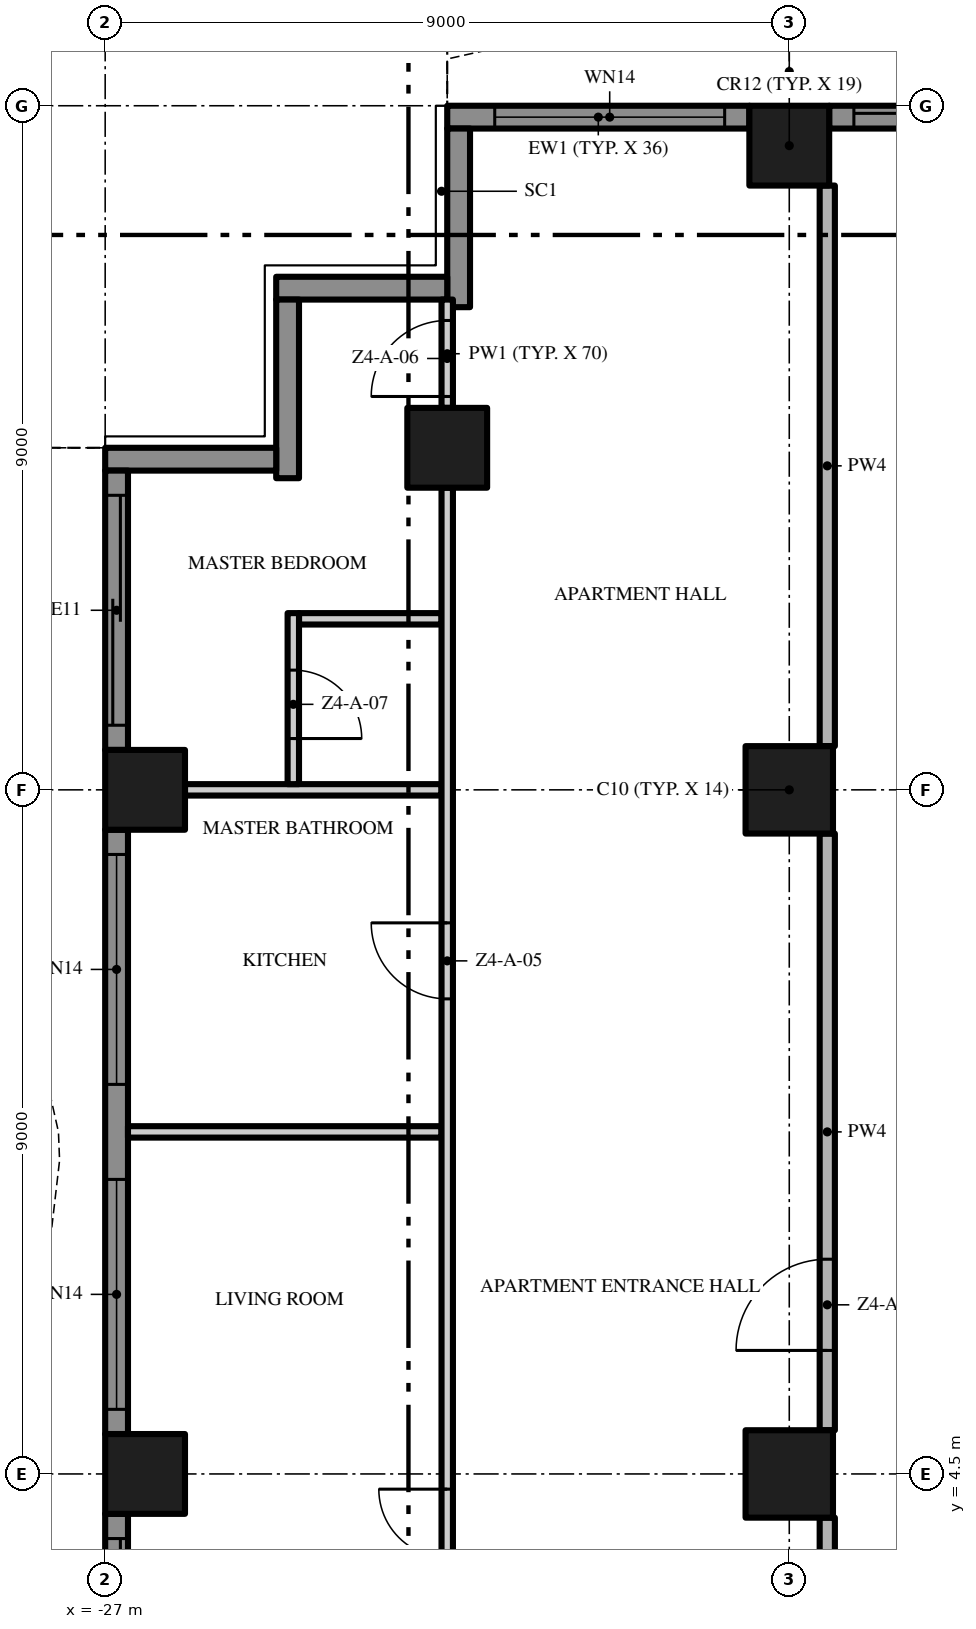
"""IFC4 building model, lengths in metres.
Left out: names, types, materials, properties, quantities, classifications, styles, units other than length and angle.
Written with IfcOpenShell. Run it as: python <this file> out.ifc"""

import sys

from ifc_helpers import new_model, si_unit, direction, frame, frame_2d, origin, origin_2d, place, context, subcontext, project, spatial, polyline, rectangle, outline, extrude, element, fill, save


model = new_model("IFC4")
c1 = context("Model", 3, precision=1e-05, world=origin(), true_north=direction((0.0, 1.0)))
c2 = subcontext(c1, "Body", "Model", "MODEL_VIEW")
j1 = project(units=[si_unit("LENGTHUNIT", "METRE"), si_unit("PLANEANGLEUNIT", "RADIAN")], contexts=[c1])
p1 = place(None, origin())
s1 = spatial("IfcSite", under=j1, at=p1, CompositionType="ELEMENT")
p2 = place(p1, origin())
s2 = spatial("IfcBuilding", under=s1, at=p2, CompositionType="ELEMENT")
p3 = place(p2, frame((0.0, 0.0, 184.4)))
s3 = spatial("IfcBuildingStorey", under=s2, at=p3, CompositionType="ELEMENT", Elevation=184.4)
p4 = place(p3, frame((-18.0, 13.5, 0.0), z_axis=(0.0, 0.0, 1.0), x_axis=(1.0, 0.0, 0.0)))
e1 = element("IfcColumn", 1, at=p4, inside=s3, PredefinedType="COLUMN", context=c2, shape_type="SweptSolid", body=[
    extrude(rectangle(XDim=1.15, YDim=1.15, at=origin_2d()), origin(), (0.0, 0.0, 1.0), 3.5),
])
p5 = place(p3, frame((-18.0, 21.975, 0.0), z_axis=(0.0, 0.0, 1.0), x_axis=(1.0, 0.0, 0.0)))
e2 = element("IfcColumn", 2, at=p5, inside=s3, PredefinedType="COLUMN", context=c2, shape_type="SweptSolid", body=[
    extrude(rectangle(XDim=1.05, YDim=1.05, at=origin_2d()), origin(), (0.0, 0.0, 1.0), 3.5),
])
p6 = place(p3, frame((-18.0, 4.5, 0.0), z_axis=(0.0, 0.0, 1.0), x_axis=(1.0, 0.0, 0.0)))
e3 = element("IfcColumn", 3, at=p6, inside=s3, PredefinedType="COLUMN", context=c2, shape_type="SweptSolid", body=[
    extrude(rectangle(XDim=1.15, YDim=1.15, at=origin_2d()), origin(), (0.0, 0.0, 1.0), 3.5),
])
for number, where, z_axis, x_axis in (
    (4, (-26.475, 13.5, 0.0), (0.0, 0.0, 1.0), (1.0, 0.0, 0.0)),
    (5, (-22.5, 18.0, 0.0), (0.0, 0.0, 1.0), (1.0, 0.0, 0.0)),
    (6, (-26.475, 4.5, 0.0), (0.0, 0.0, 1.0), (1.0, 0.0, 0.0)),
):
    element("IfcColumn", number, at=place(p3, frame(where, z_axis=z_axis, x_axis=x_axis)), inside=s3, PredefinedType="COLUMN", context=c2, shape_type="SweptSolid", body=[
        extrude(rectangle(XDim=1.05, YDim=1.05, at=origin_2d()), origin(), (0.0, 0.0, 1.0), 3.5),
    ])
p7 = place(p3, frame((-17.475, 22.35, 0.0), z_axis=(0.0, 0.0, 1.0), x_axis=(1.0, 0.0, 0.0)))
e7 = element("IfcWall", 7, at=p7, inside=s3, PredefinedType="SOLIDWALL", context=c2, shape_type="SweptSolid", body=[
    extrude(rectangle(XDim=3.975, YDim=0.3, at=frame_2d((1.988, 0.0))), origin(), (0.0, 0.0, 1.0), 3.5),
])
p8 = place(p7, frame((0.325, 0.0, 0.0)))
e8 = element("IfcOpeningElement", 8, at=p8, cuts=e7, PredefinedType="OPENING", context=c2, shape_type="SweptSolid", body=[
    extrude(rectangle(XDim=3.025, YDim=2.4, at=frame_2d((1.512, 1.2))), frame((0.0, 0.16, 0.0), z_axis=(0.0, -1.0, 0.0), x_axis=(1.0, 0.0, 0.0)), (0.0, 0.0, 1.0), 0.32),
])
p9 = place(p3, frame((-22.5, 22.35, 0.0), z_axis=(0.0, 0.0, 1.0), x_axis=(1.0, 0.0, 0.0)))
e9 = element("IfcWall", 9, at=p9, inside=s3, PredefinedType="SOLIDWALL", context=c2, shape_type="SweptSolid", body=[
    extrude(rectangle(XDim=3.975, YDim=0.3, at=frame_2d((1.988, 0.0))), origin(), (0.0, 0.0, 1.0), 3.5),
])
p10 = place(p9, frame((0.625, 0.0, 0.45)))
e10 = element("IfcOpeningElement", 10, at=p10, cuts=e9, PredefinedType="OPENING", context=c2, shape_type="SweptSolid", body=[
    extrude(rectangle(XDim=3.025, YDim=2.65, at=frame_2d((1.512, 1.325))), frame((0.0, 0.16, 0.0), z_axis=(0.0, -1.0, 0.0), x_axis=(1.0, 0.0, 0.0)), (0.0, 0.0, 1.0), 0.32),
])
p11 = place(p3, frame((-22.35, 19.85, 0.0), z_axis=(0.0, 0.0, 1.0), x_axis=(0.0, 1.0, 0.0)))
e11 = element("IfcWall", 11, at=p11, inside=s3, PredefinedType="SOLIDWALL", context=c2, shape_type="SweptSolid", body=[
    extrude(rectangle(XDim=2.35, YDim=0.3, at=frame_2d((1.175, 0.0))), origin(), (0.0, 0.0, 1.0), 3.5),
])
p12 = place(p3, frame((-24.75, 20.1, 0.0), z_axis=(0.0, 0.0, 1.0), x_axis=(1.0, 0.0, 0.0)))
e12 = element("IfcWall", 12, at=p12, inside=s3, PredefinedType="SOLIDWALL", context=c2, shape_type="SweptSolid", body=[
    extrude(rectangle(XDim=2.25, YDim=0.3, at=frame_2d((1.125, 0.0))), origin(), (0.0, 0.0, 1.0), 3.5),
])
p13 = place(p3, frame((-24.6, 17.6, 0.0), z_axis=(0.0, 0.0, 1.0), x_axis=(0.0, 1.0, 0.0)))
e13 = element("IfcWall", 13, at=p13, inside=s3, PredefinedType="SOLIDWALL", context=c2, shape_type="SweptSolid", body=[
    extrude(rectangle(XDim=2.35, YDim=0.3, at=frame_2d((1.175, 0.0))), origin(), (0.0, 0.0, 1.0), 3.5),
])
p14 = place(p3, frame((-27.0, 17.85, 0.0), z_axis=(0.0, 0.0, 1.0), x_axis=(1.0, 0.0, 0.0)))
e14 = element("IfcWall", 14, at=p14, inside=s3, PredefinedType="SOLIDWALL", context=c2, shape_type="SweptSolid", body=[
    extrude(rectangle(XDim=2.25, YDim=0.3, at=frame_2d((1.125, 0.0))), origin(), (0.0, 0.0, 1.0), 3.5),
])
p15 = place(p3, frame((-26.85, 14.025, 0.0), z_axis=(0.0, 0.0, 1.0), x_axis=(0.0, 1.0, 0.0)))
e15 = element("IfcWall", 15, at=p15, inside=s3, PredefinedType="SOLIDWALL", context=c2, shape_type="SweptSolid", body=[
    extrude(rectangle(XDim=3.675, YDim=0.3, at=frame_2d((1.837, 0.0))), origin(), (0.0, 0.0, 1.0), 3.5),
])
p16 = place(p15, frame((0.325, 0.0, 0.0)))
e16 = element("IfcOpeningElement", 16, at=p16, cuts=e15, PredefinedType="OPENING", context=c2, shape_type="SweptSolid", body=[
    extrude(rectangle(XDim=3.025, YDim=2.4, at=frame_2d((1.512, 1.2))), frame((0.0, 0.16, 0.0), z_axis=(0.0, -1.0, 0.0), x_axis=(1.0, 0.0, 0.0)), (0.0, 0.0, 1.0), 0.32),
])
p17 = place(p3, frame((-26.85, 5.025, 0.0), z_axis=(0.0, 0.0, 1.0), x_axis=(0.0, 1.0, 0.0)))
e17 = element("IfcWall", 17, at=p17, inside=s3, PredefinedType="SOLIDWALL", context=c2, shape_type="SweptSolid", body=[
    extrude(rectangle(XDim=7.95, YDim=0.3, at=frame_2d((3.975, 0.0))), origin(), (0.0, 0.0, 1.0), 3.5),
])
p18 = place(p17, frame((4.6, 0.0, 0.45)))
e18 = element("IfcOpeningElement", 18, at=p18, cuts=e17, PredefinedType="OPENING", context=c2, shape_type="SweptSolid", body=[
    extrude(rectangle(XDim=3.025, YDim=2.65, at=frame_2d((1.512, 1.325))), frame((0.0, 0.16, 0.0), z_axis=(0.0, -1.0, 0.0), x_axis=(1.0, 0.0, 0.0)), (0.0, 0.0, 1.0), 0.32),
])
p19 = place(p17, frame((0.325, 0.0, 0.45)))
e19 = element("IfcOpeningElement", 19, at=p19, cuts=e17, PredefinedType="OPENING", context=c2, shape_type="SweptSolid", body=[
    extrude(rectangle(XDim=3.025, YDim=2.65, at=frame_2d((1.512, 1.325))), frame((0.0, 0.16, 0.0), z_axis=(0.0, -1.0, 0.0), x_axis=(1.0, 0.0, 0.0)), (0.0, 0.0, 1.0), 0.32),
])
p20 = place(p3, frame((-26.85, -3.975, 0.0), z_axis=(0.0, 0.0, 1.0), x_axis=(0.0, 1.0, 0.0)))
e20 = element("IfcWall", 20, at=p20, inside=s3, PredefinedType="SOLIDWALL", context=c2, shape_type="SweptSolid", body=[
    extrude(rectangle(XDim=7.95, YDim=0.3, at=frame_2d((3.975, 0.0))), origin(), (0.0, 0.0, 1.0), 3.5),
])
p21 = place(p20, frame((4.6, 0.0, 0.0)))
e21 = element("IfcOpeningElement", 21, at=p21, cuts=e20, PredefinedType="OPENING", context=c2, shape_type="SweptSolid", body=[
    extrude(rectangle(XDim=3.025, YDim=2.4, at=frame_2d((1.512, 1.2))), frame((0.0, 0.16, 0.0), z_axis=(0.0, -1.0, 0.0), x_axis=(1.0, 0.0, 0.0)), (0.0, 0.0, 1.0), 0.32),
])
p22 = place(p20, frame((0.325, 0.0, 0.45)))
e22 = element("IfcOpeningElement", 22, at=p22, cuts=e20, PredefinedType="OPENING", context=c2, shape_type="SweptSolid", body=[
    extrude(rectangle(XDim=3.025, YDim=2.65, at=frame_2d((1.512, 1.325))), frame((0.0, 0.16, 0.0), z_axis=(0.0, -1.0, 0.0), x_axis=(1.0, 0.0, 0.0)), (0.0, 0.0, 1.0), 0.32),
])
p23 = place(p3, origin())
e23 = element("IfcWall", 23, at=p23, inside=s3, PredefinedType="USERDEFINED", context=c2, shape_type="SweptSolid", body=[
    extrude(outline(polyline([(-13.5, 25.149), (-15.0, 25.485), (-15.375, 25.5), (-16.5, 25.369), (-18.0, 24.845), (-19.5, 24.112), (-21.0, 23.451), (-22.5, 23.115), (-22.445, 22.871), (-20.921, 23.213), (-19.395, 23.885), (-17.904, 24.614), (-16.444, 25.124), (-15.365, 25.249), (-15.033, 25.236), (-13.555, 24.905), (-13.5, 25.149)])), origin(), (0.0, 0.0, 1.0), 0.9),
])
p24 = place(p3, origin())
e24 = element("IfcWall", 24, at=p24, inside=s3, PredefinedType="USERDEFINED", context=c2, shape_type="SweptSolid", body=[
    extrude(outline(polyline([(-29.649, 18.0), (-29.985, 16.5), (-30.0, 16.125), (-29.869, 15.0), (-29.345, 13.5), (-28.612, 12.0), (-27.951, 10.5), (-27.615, 9.0), (-27.6, 8.625), (-27.731, 7.5), (-28.255, 6.0), (-28.988, 4.5), (-29.649, 3.0), (-29.985, 1.5), (-30.0, 1.125), (-29.869, 0.0), (-29.345, -1.5), (-28.612, -3.0), (-27.951, -4.5), (-27.615, -6.0), (-27.6, -6.375), (-27.731, -7.5), (-28.255, -9.0), (-28.988, -10.5), (-29.649, -12.0), (-29.985, -13.5), (-30.0, -13.875), (-29.869, -15.0), (-29.345, -16.5), (-28.612, -18.0), (-28.388, -17.89), (-29.114, -16.404), (-29.624, -14.944), (-29.749, -13.865), (-29.736, -13.533), (-29.41, -12.079), (-28.761, -10.605), (-28.024, -9.096), (-27.486, -7.556), (-27.349, -6.385), (-27.366, -5.967), (-27.713, -4.421), (-28.385, -2.895), (-29.114, -1.404), (-29.624, 0.056), (-29.749, 1.135), (-29.736, 1.467), (-29.41, 2.921), (-28.761, 4.395), (-28.024, 5.904), (-27.486, 7.444), (-27.349, 8.615), (-27.366, 9.033), (-27.713, 10.579), (-28.385, 12.105), (-29.114, 13.596), (-29.624, 15.056), (-29.749, 16.135), (-29.736, 16.467), (-29.405, 17.945), (-29.649, 18.0)])), origin(), (0.0, 0.0, 1.0), 0.9),
])
p25 = place(p3, frame((-26.7, 9.0, 0.0), z_axis=(0.0, 0.0, 1.0), x_axis=(1.0, 0.0, 0.0)))
e25 = element("IfcWall", 25, at=p25, inside=s3, PredefinedType="PARTITIONING", context=c2, shape_type="SweptSolid", body=[
    extrude(rectangle(XDim=4.125, YDim=0.15, at=frame_2d((2.062, 0.0))), origin(), (0.0, 0.0, 1.0), 3.5),
])
p26 = place(p3, frame((-25.95, 13.5, 0.0), z_axis=(0.0, 0.0, 1.0), x_axis=(1.0, 0.0, 0.0)))
e26 = element("IfcWall", 26, at=p26, inside=s3, PredefinedType="PARTITIONING", context=c2, shape_type="SweptSolid", body=[
    extrude(rectangle(XDim=3.375, YDim=0.15, at=frame_2d((1.688, 0.0))), origin(), (0.0, 0.0, 1.0), 3.5),
])
p27 = place(p3, frame((-24.45, 15.75, 0.0), z_axis=(0.0, 0.0, 1.0), x_axis=(1.0, 0.0, 0.0)))
e27 = element("IfcWall", 27, at=p27, inside=s3, PredefinedType="PARTITIONING", context=c2, shape_type="SweptSolid", body=[
    extrude(rectangle(XDim=1.875, YDim=0.15, at=frame_2d((0.938, 0.0))), origin(), (0.0, 0.0, 1.0), 3.5),
])
p28 = place(p3, frame((-24.525, 15.825, 0.0), z_axis=(0.0, 0.0, 1.0), x_axis=(0.0, -1.0, 0.0)))
e28 = element("IfcWall", 28, at=p28, inside=s3, PredefinedType="PARTITIONING", context=c2, shape_type="SweptSolid", body=[
    extrude(rectangle(XDim=2.25, YDim=0.15, at=frame_2d((1.125, 0.0))), origin(), (0.0, 0.0, 1.0), 3.5),
])
p29 = place(p28, frame((0.75, 0.0, 0.0)))
e29 = element("IfcOpeningElement", 29, at=p29, cuts=e28, PredefinedType="OPENING", context=c2, shape_type="SweptSolid", body=[
    extrude(rectangle(XDim=0.9, YDim=2.1, at=frame_2d((0.45, 1.05))), frame((0.0, 0.085, 0.0), z_axis=(0.0, -1.0, 0.0), x_axis=(1.0, 0.0, 0.0)), (0.0, 0.0, 1.0), 0.17),
])
p30 = place(p3, frame((-22.5, 0.1, 0.0), z_axis=(0.0, 0.0, 1.0), x_axis=(0.0, 1.0, 0.0)))
e30 = element("IfcWall", 30, at=p30, inside=s3, PredefinedType="PARTITIONING", context=c2, shape_type="SweptSolid", body=[
    extrude(rectangle(XDim=17.375, YDim=0.15, at=frame_2d((8.688, 0.0))), origin(), (0.0, 0.0, 1.0), 3.5),
])
p31 = place(p30, frame((2.4, 0.0, 0.0)))
e31 = element("IfcOpeningElement", 31, at=p31, cuts=e30, PredefinedType="OPENING", context=c2, shape_type="SweptSolid", body=[
    extrude(rectangle(XDim=1.8, YDim=2.4, at=frame_2d((0.9, 1.2))), frame((0.0, 0.085, 0.0), z_axis=(0.0, -1.0, 0.0), x_axis=(1.0, 0.0, 0.0)), (0.0, 0.0, 1.0), 0.17),
])
p32 = place(p30, frame((10.65, 0.0, 0.0)))
e32 = element("IfcOpeningElement", 32, at=p32, cuts=e30, PredefinedType="OPENING", context=c2, shape_type="SweptSolid", body=[
    extrude(rectangle(XDim=1.0, YDim=2.4, at=frame_2d((0.5, 1.2))), frame((0.0, 0.085, 0.0), z_axis=(0.0, -1.0, 0.0), x_axis=(1.0, 0.0, 0.0)), (0.0, 0.0, 1.0), 0.17),
])
p33 = place(p3, frame((-22.5, 18.525, 0.0), z_axis=(0.0, 0.0, 1.0), x_axis=(0.0, 1.0, 0.0)))
e33 = element("IfcWall", 33, at=p33, inside=s3, PredefinedType="PARTITIONING", context=c2, shape_type="SweptSolid", body=[
    extrude(rectangle(XDim=1.425, YDim=0.15, at=frame_2d((0.713, 0.0))), origin(), (0.0, 0.0, 1.0), 3.5),
])
p34 = place(p33, frame((0.15, 0.0, 0.0)))
e34 = element("IfcOpeningElement", 34, at=p34, cuts=e33, PredefinedType="OPENING", context=c2, shape_type="SweptSolid", body=[
    extrude(rectangle(XDim=1.0, YDim=2.4, at=frame_2d((0.5, 1.2))), frame((0.0, 0.085, 0.0), z_axis=(0.0, -1.0, 0.0), x_axis=(1.0, 0.0, 0.0)), (0.0, 0.0, 1.0), 0.17),
])
p35 = place(p3, frame((-17.5, -0.2, 0.0), z_axis=(0.0, 0.0, 1.0), x_axis=(0.0, 1.0, 0.0)))
e35 = element("IfcWall", 35, at=p35, inside=s3, PredefinedType="PARTITIONING", context=c2, shape_type="SweptSolid", body=[
    extrude(rectangle(XDim=4.125, YDim=0.2, at=frame_2d((2.062, 0.0))), origin(), (0.0, 0.0, 1.0), 3.5),
])
p36 = place(p3, frame((-17.5, 5.075, 0.0), z_axis=(0.0, 0.0, 1.0), x_axis=(0.0, 1.0, 0.0)))
e36 = element("IfcWall", 36, at=p36, inside=s3, PredefinedType="PARTITIONING", context=c2, shape_type="SweptSolid", body=[
    extrude(rectangle(XDim=7.85, YDim=0.2, at=frame_2d((3.925, 0.0))), origin(), (0.0, 0.0, 1.0), 3.5),
])
p37 = place(p36, frame((1.05, 0.0, 0.0)))
e37 = element("IfcOpeningElement", 37, at=p37, cuts=e36, PredefinedType="OPENING", context=c2, shape_type="SweptSolid", body=[
    extrude(rectangle(XDim=1.2, YDim=2.4, at=frame_2d((0.6, 1.2))), frame((0.0, 0.11, 0.0), z_axis=(0.0, -1.0, 0.0), x_axis=(1.0, 0.0, 0.0)), (0.0, 0.0, 1.0), 0.22),
])
p38 = place(p3, frame((-17.5, 14.075, 0.0), z_axis=(0.0, 0.0, 1.0), x_axis=(0.0, 1.0, 0.0)))
e38 = element("IfcWall", 38, at=p38, inside=s3, PredefinedType="PARTITIONING", context=c2, shape_type="SweptSolid", body=[
    extrude(rectangle(XDim=7.375, YDim=0.2, at=frame_2d((3.688, 0.0))), origin(), (0.0, 0.0, 1.0), 3.5),
])
p39 = place(p8, origin())
e39 = element("IfcDoor", 39, at=p39, inside=s3, OperationType="SINGLE_SWING_LEFT", PredefinedType="DOOR", context=c2, shape_type="SweptSolid", body=[
    extrude(rectangle(XDim=3.025, YDim=2.4, at=frame_2d((1.512, 1.2))), frame((0.0, 0.025, 0.0), z_axis=(0.0, -1.0, 0.0), x_axis=(1.0, 0.0, 0.0)), (0.0, 0.0, 1.0), 0.05),
])
fill(e8, e39)
p40 = place(p10, origin())
e40 = element("IfcWindow", 40, at=p40, inside=s3, PartitioningType="SINGLE_PANEL", PredefinedType="WINDOW", context=c2, shape_type="SweptSolid", body=[
    extrude(rectangle(XDim=3.025, YDim=2.65, at=frame_2d((1.512, 1.325))), frame((0.0, 0.03, 0.0), z_axis=(0.0, -1.0, 0.0), x_axis=(1.0, 0.0, 0.0)), (0.0, 0.0, 1.0), 0.06),
])
fill(e10, e40)
p41 = place(p16, origin())
e41 = element("IfcDoor", 41, at=p41, inside=s3, OperationType="SINGLE_SWING_LEFT", PredefinedType="DOOR", context=c2, shape_type="SweptSolid", body=[
    extrude(rectangle(XDim=3.025, YDim=2.4, at=frame_2d((1.512, 1.2))), frame((0.0, 0.025, 0.0), z_axis=(0.0, -1.0, 0.0), x_axis=(1.0, 0.0, 0.0)), (0.0, 0.0, 1.0), 0.05),
])
fill(e16, e41)
p42 = place(p18, origin())
e42 = element("IfcWindow", 42, at=p42, inside=s3, PartitioningType="SINGLE_PANEL", PredefinedType="WINDOW", context=c2, shape_type="SweptSolid", body=[
    extrude(rectangle(XDim=3.025, YDim=2.65, at=frame_2d((1.512, 1.325))), frame((0.0, 0.03, 0.0), z_axis=(0.0, -1.0, 0.0), x_axis=(1.0, 0.0, 0.0)), (0.0, 0.0, 1.0), 0.06),
])
fill(e18, e42)
p43 = place(p19, origin())
e43 = element("IfcWindow", 43, at=p43, inside=s3, PartitioningType="SINGLE_PANEL", PredefinedType="WINDOW", context=c2, shape_type="SweptSolid", body=[
    extrude(rectangle(XDim=3.025, YDim=2.65, at=frame_2d((1.512, 1.325))), frame((0.0, 0.03, 0.0), z_axis=(0.0, -1.0, 0.0), x_axis=(1.0, 0.0, 0.0)), (0.0, 0.0, 1.0), 0.06),
])
fill(e19, e43)
p44 = place(p21, origin())
e44 = element("IfcDoor", 44, at=p44, inside=s3, OperationType="SINGLE_SWING_LEFT", PredefinedType="DOOR", context=c2, shape_type="SweptSolid", body=[
    extrude(rectangle(XDim=3.025, YDim=2.4, at=frame_2d((1.512, 1.2))), frame((0.0, 0.025, 0.0), z_axis=(0.0, -1.0, 0.0), x_axis=(1.0, 0.0, 0.0)), (0.0, 0.0, 1.0), 0.05),
])
fill(e21, e44)
p45 = place(p37, origin())
e45 = element("IfcDoor", 45, at=p45, inside=s3, OperationType="SINGLE_SWING_LEFT", PredefinedType="DOOR", context=c2, shape_type="SweptSolid", body=[
    extrude(rectangle(XDim=1.2, YDim=2.4, at=frame_2d((0.6, 1.2))), frame((0.0, 0.025, 0.0), z_axis=(0.0, -1.0, 0.0), x_axis=(1.0, 0.0, 0.0)), (0.0, 0.0, 1.0), 0.05),
])
fill(e37, e45)
p46 = place(p31, origin())
e46 = element("IfcDoor", 46, at=p46, inside=s3, OperationType="DOUBLE_DOOR_SINGLE_SWING", PredefinedType="DOOR", context=c2, shape_type="SweptSolid", body=[
    extrude(rectangle(XDim=1.8, YDim=2.4, at=frame_2d((0.9, 1.2))), frame((0.0, 0.025, 0.0), z_axis=(0.0, -1.0, 0.0), x_axis=(1.0, 0.0, 0.0)), (0.0, 0.0, 1.0), 0.05),
])
fill(e31, e46)
p47 = place(p32, origin())
e47 = element("IfcDoor", 47, at=p47, inside=s3, OperationType="SINGLE_SWING_RIGHT", PredefinedType="DOOR", context=c2, shape_type="SweptSolid", body=[
    extrude(rectangle(XDim=1.0, YDim=2.4, at=frame_2d((0.5, 1.2))), frame((0.0, 0.025, 0.0), z_axis=(0.0, -1.0, 0.0), x_axis=(1.0, 0.0, 0.0)), (0.0, 0.0, 1.0), 0.05),
])
fill(e32, e47)
p48 = place(p34, origin())
e48 = element("IfcDoor", 48, at=p48, inside=s3, OperationType="SINGLE_SWING_LEFT", PredefinedType="DOOR", context=c2, shape_type="SweptSolid", body=[
    extrude(rectangle(XDim=1.0, YDim=2.4, at=frame_2d((0.5, 1.2))), frame((0.0, 0.025, 0.0), z_axis=(0.0, -1.0, 0.0), x_axis=(1.0, 0.0, 0.0)), (0.0, 0.0, 1.0), 0.05),
])
fill(e34, e48)
p49 = place(p29, origin())
e49 = element("IfcDoor", 49, at=p49, inside=s3, OperationType="SINGLE_SWING_RIGHT", PredefinedType="DOOR", context=c2, shape_type="SweptSolid", body=[
    extrude(rectangle(XDim=0.9, YDim=2.1, at=frame_2d((0.45, 1.05))), frame((0.0, 0.025, 0.0), z_axis=(0.0, -1.0, 0.0), x_axis=(1.0, 0.0, 0.0)), (0.0, 0.0, 1.0), 0.05),
])
fill(e29, e49)
save(model, sys.argv[1])
